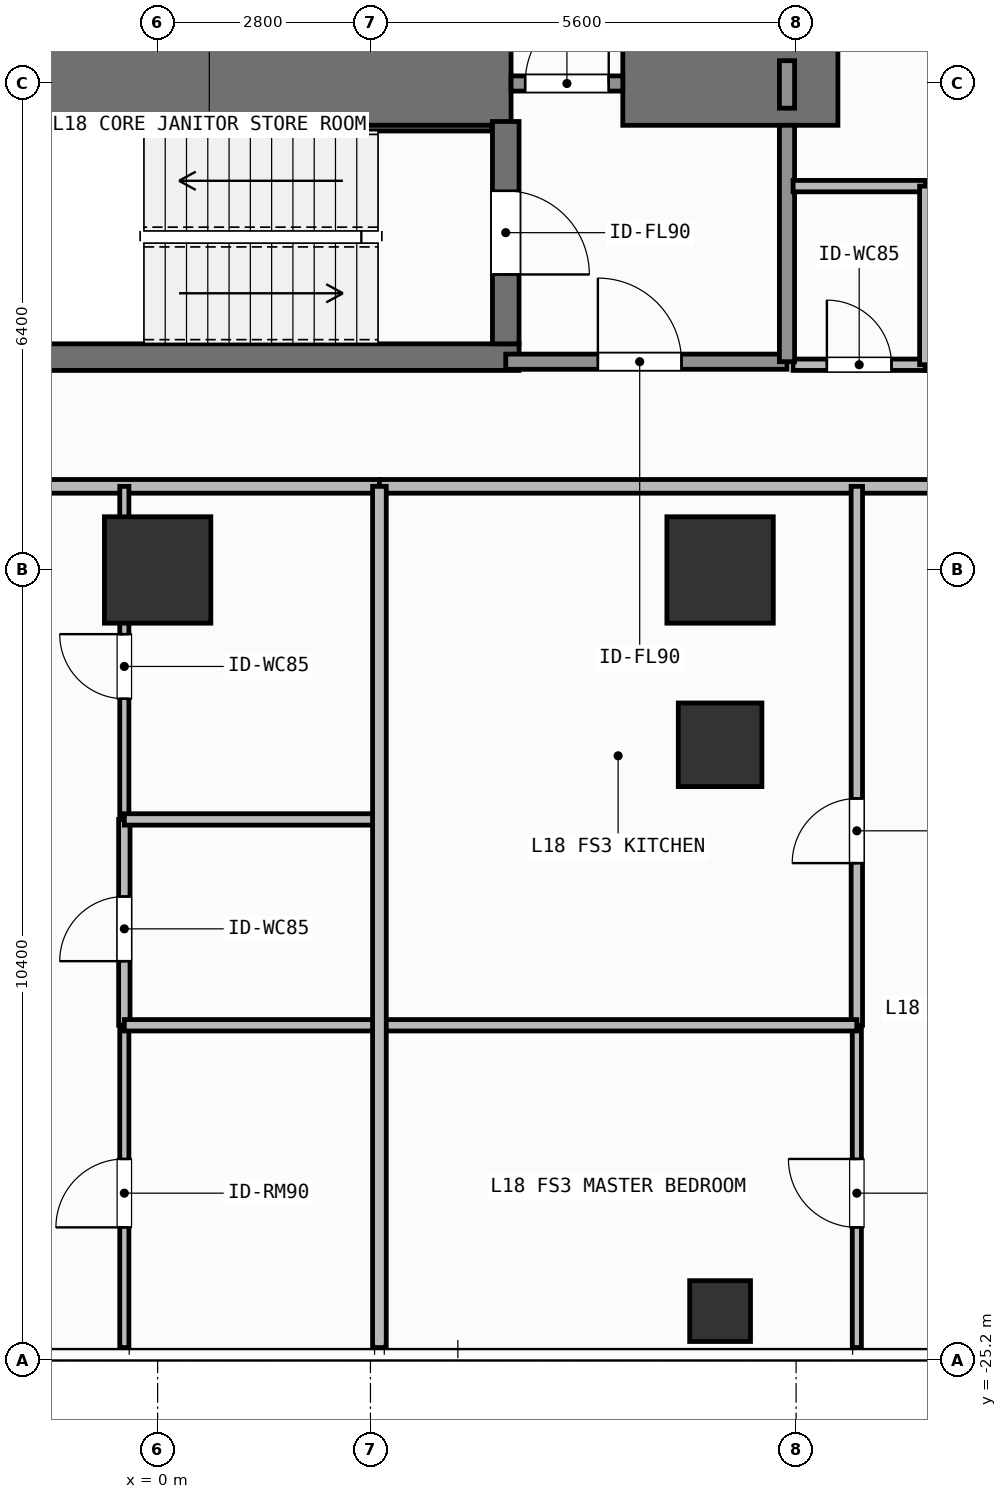
"""IFC4 building model, lengths in metres.
Left out: names, types, materials, properties, quantities, classifications, styles, units other than length and angle.
Written with IfcOpenShell. Run it as: python <this file> out.ifc"""

import sys

from ifc_helpers import new_model, si_unit, direction, frame, frame_2d, origin, origin_2d, place, context, subcontext, project, spatial, rectangle, hollow_rectangle, extrude, element, fill, save


model = new_model("IFC4")
c1 = context("Model", 3, precision=1e-05, world=origin(), true_north=direction((0.0, 1.0)))
c2 = subcontext(c1, "Body", "Model", "MODEL_VIEW")
j1 = project(units=[si_unit("LENGTHUNIT", "METRE"), si_unit("PLANEANGLEUNIT", "RADIAN")], contexts=[c1])
p1 = place(None, origin())
s1 = spatial("IfcSite", under=j1, at=p1, CompositionType="ELEMENT")
p2 = place(p1, origin())
s2 = spatial("IfcBuilding", under=s1, at=p2, CompositionType="ELEMENT")
p3 = place(p2, frame((0.0, 0.0, 69.6)))
s3 = spatial("IfcBuildingStorey", under=s2, at=p3, CompositionType="ELEMENT", Elevation=69.6)
p4 = place(p3, frame((-2.62, -8.4, 0.0), z_axis=(0.0, 0.0, 1.0), x_axis=(1.0, 0.0, 0.0)))
e1 = element("IfcWall", 1, at=p4, inside=s3, PredefinedType="SHEAR", context=c2, shape_type="SweptSolid", body=[
    extrude(rectangle(XDim=7.27, YDim=1.1, at=frame_2d((3.635, 0.0))), origin(), (0.0, 0.0, 1.0), 3.9),
])
p5 = place(p3, frame((6.12, -8.4, 0.0), z_axis=(0.0, 0.0, 1.0), x_axis=(1.0, 0.0, 0.0)))
e2 = element("IfcWall", 2, at=p5, inside=s3, PredefinedType="SHEAR", context=c2, shape_type="SweptSolid", body=[
    extrude(rectangle(XDim=2.83, YDim=1.1, at=frame_2d((1.415, 0.0))), origin(), (0.0, 0.0, 1.0), 3.9),
])
p6 = place(p3, frame((-2.555, -12.0, 0.0), z_axis=(0.0, 0.0, 1.0), x_axis=(1.0, 0.0, 0.0)))
e3 = element("IfcWall", 3, at=p6, inside=s3, PredefinedType="SHEAR", context=c2, shape_type="SweptSolid", body=[
    extrude(rectangle(XDim=7.31, YDim=0.35, at=frame_2d((3.655, 0.0))), origin(), (0.0, 0.0, 1.0), 3.9),
])
p7 = place(p3, frame((-2.2, -8.988, 0.0), z_axis=(0.0, 0.0, 1.0), x_axis=(1.0, 0.0, 0.0)))
e4 = element("IfcWall", 4, at=p7, inside=s3, PredefinedType="SHEAR", context=c2, shape_type="SweptSolid", body=[
    extrude(rectangle(XDim=6.6, YDim=0.075, at=frame_2d((3.3, 0.0))), origin(), (0.0, 0.0, 1.0), 3.9),
])
p8 = place(p3, frame((4.58, -8.9, 0.0), z_axis=(0.0, 0.0, 1.0), x_axis=(0.0, -1.0, 0.0)))
e5 = element("IfcWall", 5, at=p8, inside=s3, PredefinedType="SHEAR", context=c2, shape_type="SweptSolid", body=[
    extrude(rectangle(XDim=2.925, YDim=0.35, at=frame_2d((1.462, 0.0))), origin(), (0.0, 0.0, 1.0), 3.9),
])
p9 = place(p8, frame((0.913, 0.0, 0.0)))
e6 = element("IfcOpeningElement", 6, at=p9, cuts=e5, PredefinedType="OPENING", context=c2, shape_type="SweptSolid", body=[
    extrude(rectangle(XDim=1.1, YDim=2.15, at=frame_2d((0.55, 1.075))), frame((0.0, 0.185, 0.0), z_axis=(0.0, -1.0, 0.0), x_axis=(1.0, 0.0, 0.0)), (0.0, 0.0, 1.0), 0.37),
])
for number, where, z_axis, x_axis in (
    (7, (0.0, -14.8, 0.0), (0.0, 0.0, 1.0), (1.0, 0.0, 0.0)),
    (8, (7.4, -14.8, 0.0), (0.0, 0.0, 1.0), (1.0, 0.0, 0.0)),
):
    element("IfcColumn", number, at=place(p3, frame(where, z_axis=z_axis, x_axis=x_axis)), inside=s3, PredefinedType="COLUMN", context=c2, shape_type="SweptSolid", body=[
        extrude(rectangle(XDim=1.4, YDim=1.4, at=origin_2d()), origin(), (0.0, 0.0, 1.0), 3.9),
    ])
p10 = place(p3, frame((7.4, -17.1, 0.0), z_axis=(0.0, 0.0, 1.0), x_axis=(1.0, 0.0, 0.0)))
e9 = element("IfcColumn", 9, at=p10, inside=s3, PredefinedType="COLUMN", context=c2, shape_type="SweptSolid", body=[
    extrude(rectangle(XDim=1.1, YDim=1.1, at=origin_2d()), origin(), (0.0, 0.0, 1.0), 3.9),
])
p11 = place(p3, frame((7.4, -24.55, 0.0), z_axis=(0.0, 0.0, 1.0), x_axis=(1.0, 0.0, 0.0)))
e10 = element("IfcColumn", 10, at=p11, inside=s3, PredefinedType="COLUMN", context=c2, shape_type="SweptSolid", body=[
    extrude(hollow_rectangle(XDim=0.8, YDim=0.8, WallThickness=0.036, at=origin_2d()), origin(), (0.0, 0.0, 1.0), 3.9),
])
p12 = place(p3, frame((4.58, -12.06, 0.0), z_axis=(0.0, 0.0, 1.0), x_axis=(1.0, 0.0, 0.0)))
e11 = element("IfcWall", 11, at=p12, inside=s3, PredefinedType="SOLIDWALL", context=c2, shape_type="SweptSolid", body=[
    extrude(rectangle(XDim=3.7, YDim=0.2, at=frame_2d((1.85, 0.0))), origin(), (0.0, 0.0, 1.0), 3.68),
])
p13 = place(p12, frame((1.212, 0.0, 0.0)))
e12 = element("IfcOpeningElement", 12, at=p13, cuts=e11, PredefinedType="OPENING", context=c2, shape_type="SweptSolid", body=[
    extrude(rectangle(XDim=1.1, YDim=2.15, at=frame_2d((0.55, 1.075))), frame((0.0, 0.11, 0.0), z_axis=(0.0, -1.0, 0.0), x_axis=(1.0, 0.0, 0.0)), (0.0, 0.0, 1.0), 0.22),
])
p14 = place(p3, frame((4.65, -8.4, 0.0), z_axis=(0.0, 0.0, 1.0), x_axis=(1.0, 0.0, 0.0)))
e13 = element("IfcWall", 13, at=p14, inside=s3, PredefinedType="SOLIDWALL", context=c2, shape_type="SweptSolid", body=[
    extrude(rectangle(XDim=1.47, YDim=0.2, at=frame_2d((0.735, 0.0))), origin(), (0.0, 0.0, 1.0), 2.72),
])
p15 = place(p14, frame((0.185, 0.0, 0.0)))
e14 = element("IfcOpeningElement", 14, at=p15, cuts=e13, PredefinedType="OPENING", context=c2, shape_type="SweptSolid", body=[
    extrude(rectangle(XDim=1.1, YDim=2.15, at=frame_2d((0.55, 1.075))), frame((0.0, 0.11, 0.0), z_axis=(0.0, -1.0, 0.0), x_axis=(1.0, 0.0, 0.0)), (0.0, 0.0, 1.0), 0.22),
])
p16 = place(p3, frame((8.36, -12.1, 0.0), z_axis=(0.0, 0.0, 1.0), x_axis=(1.0, 0.0, 0.0)))
e15 = element("IfcWall", 15, at=p16, inside=s3, PredefinedType="PARTITIONING", context=c2, shape_type="SweptSolid", body=[
    extrude(rectangle(XDim=1.74, YDim=0.15, at=frame_2d((0.87, 0.0))), origin(), (0.0, 0.0, 1.0), 3.68),
])
p17 = place(p16, frame((0.445, 0.0, 0.0)))
e16 = element("IfcOpeningElement", 16, at=p17, cuts=e15, PredefinedType="OPENING", context=c2, shape_type="SweptSolid", body=[
    extrude(rectangle(XDim=0.85, YDim=2.1, at=frame_2d((0.425, 1.05))), frame((0.0, 0.085, 0.0), z_axis=(0.0, -1.0, 0.0), x_axis=(1.0, 0.0, 0.0)), (0.0, 0.0, 1.0), 0.17),
])
p18 = place(p3, frame((10.1, -12.1, 0.0), z_axis=(0.0, 0.0, 1.0), x_axis=(1.0, 0.0, 0.0)))
e17 = element("IfcWall", 17, at=p18, inside=s3, PredefinedType="PARTITIONING", context=c2, shape_type="SweptSolid", body=[
    extrude(rectangle(XDim=5.48, YDim=0.15, at=frame_2d((2.74, 0.0))), origin(), (0.0, 0.0, 1.0), 3.68),
])
p19 = place(p18, frame((2.29, 0.0, 0.0)))
e18 = element("IfcOpeningElement", 18, at=p19, cuts=e17, PredefinedType="OPENING", context=c2, shape_type="SweptSolid", body=[
    extrude(rectangle(XDim=0.9, YDim=2.1, at=frame_2d((0.45, 1.05))), frame((0.0, 0.085, 0.0), z_axis=(0.0, -1.0, 0.0), x_axis=(1.0, 0.0, 0.0)), (0.0, 0.0, 1.0), 0.17),
])
p20 = place(p3, frame((-7.061, -13.7, 0.0), z_axis=(0.0, 0.0, 1.0), x_axis=(1.0, 0.0, 0.0)))
e19 = element("IfcWall", 19, at=p20, inside=s3, PredefinedType="PARTITIONING", context=c2, shape_type="SweptSolid", body=[
    extrude(rectangle(XDim=9.979, YDim=0.18, at=frame_2d((4.99, 0.0))), origin(), (0.0, 0.0, 1.0), 3.68),
])
p21 = place(p20, frame((4.578, 0.0, 0.0)))
e20 = element("IfcOpeningElement", 20, at=p21, cuts=e19, PredefinedType="OPENING", context=c2, shape_type="SweptSolid", body=[
    extrude(rectangle(XDim=1.0, YDim=2.2, at=frame_2d((0.5, 1.1))), frame((0.0, 0.1, 0.0), z_axis=(0.0, -1.0, 0.0), x_axis=(1.0, 0.0, 0.0)), (0.0, 0.0, 1.0), 0.2),
])
p22 = place(p3, frame((-0.438, -20.79, 0.0), z_axis=(0.0, 0.0, 1.0), x_axis=(0.0, 1.0, 0.0)))
e21 = element("IfcWall", 21, at=p22, inside=s3, PredefinedType="PARTITIONING", context=c2, shape_type="SweptSolid", body=[
    extrude(rectangle(XDim=2.708, YDim=0.15, at=frame_2d((1.354, 0.0))), origin(), (0.0, 0.0, 1.0), 3.68),
])
p23 = place(p22, frame((0.844, 0.0, 0.0)))
e22 = element("IfcOpeningElement", 22, at=p23, cuts=e21, PredefinedType="OPENING", context=c2, shape_type="SweptSolid", body=[
    extrude(rectangle(XDim=0.85, YDim=2.1, at=frame_2d((0.425, 1.05))), frame((0.0, 0.085, 0.0), z_axis=(0.0, -1.0, 0.0), x_axis=(1.0, 0.0, 0.0)), (0.0, 0.0, 1.0), 0.17),
])
p24 = place(p3, frame((-0.438, -18.082, 0.0), z_axis=(0.0, 0.0, 1.0), x_axis=(0.0, 1.0, 0.0)))
e23 = element("IfcWall", 23, at=p24, inside=s3, PredefinedType="PARTITIONING", context=c2, shape_type="SweptSolid", body=[
    extrude(rectangle(XDim=4.382, YDim=0.12, at=frame_2d((2.191, 0.0))), origin(), (0.0, 0.0, 1.0), 3.68),
])
p25 = place(p24, frame((1.588, 0.0, 0.0)))
e24 = element("IfcOpeningElement", 24, at=p25, cuts=e23, PredefinedType="OPENING", context=c2, shape_type="SweptSolid", body=[
    extrude(rectangle(XDim=0.85, YDim=2.1, at=frame_2d((0.425, 1.05))), frame((0.0, 0.07, 0.0), z_axis=(0.0, -1.0, 0.0), x_axis=(1.0, 0.0, 0.0)), (0.0, 0.0, 1.0), 0.14),
])
p26 = place(p3, frame((-0.438, -25.03, 0.0), z_axis=(0.0, 0.0, 1.0), x_axis=(0.0, 1.0, 0.0)))
e25 = element("IfcWall", 25, at=p26, inside=s3, PredefinedType="PARTITIONING", context=c2, shape_type="SweptSolid", body=[
    extrude(rectangle(XDim=4.24, YDim=0.12, at=frame_2d((2.12, 0.0))), origin(), (0.0, 0.0, 1.0), 3.68),
])
p27 = place(p26, frame((1.581, 0.0, 0.0)))
e26 = element("IfcOpeningElement", 26, at=p27, cuts=e25, PredefinedType="OPENING", context=c2, shape_type="SweptSolid", body=[
    extrude(rectangle(XDim=0.9, YDim=2.1, at=frame_2d((0.45, 1.05))), frame((0.0, 0.07, 0.0), z_axis=(0.0, -1.0, 0.0), x_axis=(1.0, 0.0, 0.0)), (0.0, 0.0, 1.0), 0.14),
])
p28 = place(p3, frame((2.918, -13.7, 0.0), z_axis=(0.0, 0.0, 1.0), x_axis=(1.0, 0.0, 0.0)))
e27 = element("IfcWall", 27, at=p28, inside=s3, PredefinedType="PARTITIONING", context=c2, shape_type="SweptSolid", body=[
    extrude(rectangle(XDim=15.702, YDim=0.18, at=frame_2d((7.851, 0.0))), origin(), (0.0, 0.0, 1.0), 3.68),
])
p29 = place(p28, frame((7.531, 0.0, 0.0)))
e28 = element("IfcOpeningElement", 28, at=p29, cuts=e27, PredefinedType="OPENING", context=c2, shape_type="SweptSolid", body=[
    extrude(rectangle(XDim=1.0, YDim=2.2, at=frame_2d((0.5, 1.1))), frame((0.0, 0.1, 0.0), z_axis=(0.0, -1.0, 0.0), x_axis=(1.0, 0.0, 0.0)), (0.0, 0.0, 1.0), 0.2),
])
p30 = place(p3, frame((9.199, -20.79, 0.0), z_axis=(0.0, 0.0, 1.0), x_axis=(0.0, 1.0, 0.0)))
e29 = element("IfcWall", 29, at=p30, inside=s3, PredefinedType="PARTITIONING", context=c2, shape_type="SweptSolid", body=[
    extrude(rectangle(XDim=7.09, YDim=0.15, at=frame_2d((3.545, 0.0))), origin(), (0.0, 0.0, 1.0), 3.68),
])
p31 = place(p30, frame((2.133, 0.0, 0.0)))
e30 = element("IfcOpeningElement", 30, at=p31, cuts=e29, PredefinedType="OPENING", context=c2, shape_type="SweptSolid", body=[
    extrude(rectangle(XDim=0.85, YDim=2.1, at=frame_2d((0.425, 1.05))), frame((0.0, 0.085, 0.0), z_axis=(0.0, -1.0, 0.0), x_axis=(1.0, 0.0, 0.0)), (0.0, 0.0, 1.0), 0.17),
])
p32 = place(p3, frame((9.199, -25.03, 0.0), z_axis=(0.0, 0.0, 1.0), x_axis=(0.0, 1.0, 0.0)))
e31 = element("IfcWall", 31, at=p32, inside=s3, PredefinedType="PARTITIONING", context=c2, shape_type="SweptSolid", body=[
    extrude(rectangle(XDim=4.24, YDim=0.12, at=frame_2d((2.12, 0.0))), origin(), (0.0, 0.0, 1.0), 3.68),
])
p33 = place(p32, frame((1.581, 0.0, 0.0)))
e32 = element("IfcOpeningElement", 32, at=p33, cuts=e31, PredefinedType="OPENING", context=c2, shape_type="SweptSolid", body=[
    extrude(rectangle(XDim=0.9, YDim=2.1, at=frame_2d((0.45, 1.05))), frame((0.0, 0.07, 0.0), z_axis=(0.0, -1.0, 0.0), x_axis=(1.0, 0.0, 0.0)), (0.0, 0.0, 1.0), 0.14),
])
p34 = place(p3, frame((8.28, -12.06, 0.0), z_axis=(0.0, 0.0, 1.0), x_axis=(0.0, 1.0, 0.0)))
e33 = element("IfcWall", 33, at=p34, inside=s3, PredefinedType="SOLIDWALL", context=c2, shape_type="SweptSolid", body=[
    extrude(rectangle(XDim=3.11, YDim=0.2, at=frame_2d((1.555, 0.0))), origin(), (0.0, 0.0, 1.0), 3.68),
])
p35 = place(p3, frame((8.28, -8.725, 0.0), z_axis=(0.0, 0.0, 1.0), x_axis=(0.0, 1.0, 0.0)))
e34 = element("IfcWall", 34, at=p35, inside=s3, PredefinedType="SOLIDWALL", context=c2, shape_type="SweptSolid", body=[
    extrude(rectangle(XDim=0.625, YDim=0.2, at=frame_2d((0.312, 0.0))), origin(), (0.0, 0.0, 1.0), 3.68),
])
p36 = place(p3, frame((8.36, -9.75, 0.0), z_axis=(0.0, 0.0, 1.0), x_axis=(1.0, 0.0, 0.0)))
e35 = element("IfcWall", 35, at=p36, inside=s3, PredefinedType="PARTITIONING", context=c2, shape_type="SweptSolid", body=[
    extrude(rectangle(XDim=1.74, YDim=0.15, at=frame_2d((0.87, 0.0))), origin(), (0.0, 0.0, 1.0), 3.68),
])
p37 = place(p3, frame((10.1, -12.1, 0.0), z_axis=(0.0, 0.0, 1.0), x_axis=(0.0, 1.0, 0.0)))
e36 = element("IfcWall", 36, at=p37, inside=s3, PredefinedType="PARTITIONING", context=c2, shape_type="SweptSolid", body=[
    extrude(rectangle(XDim=2.35, YDim=0.15, at=frame_2d((1.175, 0.0))), origin(), (0.0, 0.0, 1.0), 3.68),
])
for number, where, z_axis, x_axis in (
    (37, (-0.438, -18.082, 0.0), (0.0, 0.0, 1.0), (1.0, 0.0, 0.0)),
    (38, (-0.438, -20.79, 0.0), (0.0, 0.0, 1.0), (1.0, 0.0, 0.0)),
):
    element("IfcWall", number, at=place(p3, frame(where, z_axis=z_axis, x_axis=x_axis)), inside=s3, PredefinedType="PARTITIONING", context=c2, shape_type="SweptSolid", body=[
        extrude(rectangle(XDim=3.356, YDim=0.15, at=frame_2d((1.678, 0.0))), origin(), (0.0, 0.0, 1.0), 3.68),
    ])
p38 = place(p3, frame((2.918, -20.79, 0.0), z_axis=(0.0, 0.0, 1.0), x_axis=(1.0, 0.0, 0.0)))
e39 = element("IfcWall", 39, at=p38, inside=s3, PredefinedType="PARTITIONING", context=c2, shape_type="SweptSolid", body=[
    extrude(rectangle(XDim=6.281, YDim=0.15, at=frame_2d((3.141, 0.0))), origin(), (0.0, 0.0, 1.0), 3.68),
])
p39 = place(p3, frame((2.918, -25.03, 0.0), z_axis=(0.0, 0.0, 1.0), x_axis=(0.0, 1.0, 0.0)))
e40 = element("IfcWall", 40, at=p39, inside=s3, PredefinedType="PARTITIONING", context=c2, shape_type="SweptSolid", body=[
    extrude(rectangle(XDim=11.33, YDim=0.18, at=frame_2d((5.665, 0.0))), origin(), (0.0, 0.0, 1.0), 3.68),
])
p40 = place(p9, origin())
e41 = element("IfcDoor", 41, at=p40, inside=s3, OperationType="SINGLE_SWING_RIGHT", PredefinedType="DOOR", context=c2, shape_type="SweptSolid", body=[
    extrude(rectangle(XDim=1.1, YDim=2.15, at=frame_2d((0.55, 1.075))), frame((0.0, 0.025, 0.0), z_axis=(0.0, -1.0, 0.0), x_axis=(1.0, 0.0, 0.0)), (0.0, 0.0, 1.0), 0.05),
])
fill(e6, e41)
p41 = place(p13, origin())
e42 = element("IfcDoor", 42, at=p41, inside=s3, OperationType="SINGLE_SWING_LEFT", PredefinedType="DOOR", context=c2, shape_type="SweptSolid", body=[
    extrude(rectangle(XDim=1.1, YDim=2.15, at=frame_2d((0.55, 1.075))), frame((0.0, 0.025, 0.0), z_axis=(0.0, -1.0, 0.0), x_axis=(1.0, 0.0, 0.0)), (0.0, 0.0, 1.0), 0.05),
])
fill(e12, e42)
p42 = place(p15, origin())
e43 = element("IfcDoor", 43, at=p42, inside=s3, OperationType="SINGLE_SWING_RIGHT", PredefinedType="DOOR", context=c2, shape_type="SweptSolid", body=[
    extrude(rectangle(XDim=1.1, YDim=2.15, at=frame_2d((0.55, 1.075))), frame((0.0, 0.025, 0.0), z_axis=(0.0, -1.0, 0.0), x_axis=(1.0, 0.0, 0.0)), (0.0, 0.0, 1.0), 0.05),
])
fill(e14, e43)
p43 = place(p17, origin())
e44 = element("IfcDoor", 44, at=p43, inside=s3, OperationType="SINGLE_SWING_LEFT", PredefinedType="DOOR", context=c2, shape_type="SweptSolid", body=[
    extrude(rectangle(XDim=0.85, YDim=2.1, at=frame_2d((0.425, 1.05))), frame((0.0, 0.025, 0.0), z_axis=(0.0, -1.0, 0.0), x_axis=(1.0, 0.0, 0.0)), (0.0, 0.0, 1.0), 0.05),
])
fill(e16, e44)
p44 = place(p23, origin())
e45 = element("IfcDoor", 45, at=p44, inside=s3, OperationType="SINGLE_SWING_LEFT", PredefinedType="DOOR", context=c2, shape_type="SweptSolid", body=[
    extrude(rectangle(XDim=0.85, YDim=2.1, at=frame_2d((0.425, 1.05))), frame((0.0, 0.025, 0.0), z_axis=(0.0, -1.0, 0.0), x_axis=(1.0, 0.0, 0.0)), (0.0, 0.0, 1.0), 0.05),
])
fill(e22, e45)
p45 = place(p25, origin())
e46 = element("IfcDoor", 46, at=p45, inside=s3, OperationType="SINGLE_SWING_RIGHT", PredefinedType="DOOR", context=c2, shape_type="SweptSolid", body=[
    extrude(rectangle(XDim=0.85, YDim=2.1, at=frame_2d((0.425, 1.05))), frame((0.0, 0.025, 0.0), z_axis=(0.0, -1.0, 0.0), x_axis=(1.0, 0.0, 0.0)), (0.0, 0.0, 1.0), 0.05),
])
fill(e24, e46)
p46 = place(p27, origin())
e47 = element("IfcDoor", 47, at=p46, inside=s3, OperationType="SINGLE_SWING_LEFT", PredefinedType="DOOR", context=c2, shape_type="SweptSolid", body=[
    extrude(rectangle(XDim=0.9, YDim=2.1, at=frame_2d((0.45, 1.05))), frame((0.0, 0.025, 0.0), z_axis=(0.0, -1.0, 0.0), x_axis=(1.0, 0.0, 0.0)), (0.0, 0.0, 1.0), 0.05),
])
fill(e26, e47)
p47 = place(p31, origin())
e48 = element("IfcDoor", 48, at=p47, inside=s3, OperationType="SINGLE_SWING_LEFT", PredefinedType="DOOR", context=c2, shape_type="SweptSolid", body=[
    extrude(rectangle(XDim=0.85, YDim=2.1, at=frame_2d((0.425, 1.05))), frame((0.0, 0.025, 0.0), z_axis=(0.0, -1.0, 0.0), x_axis=(1.0, 0.0, 0.0)), (0.0, 0.0, 1.0), 0.05),
])
fill(e30, e48)
p48 = place(p33, origin())
e49 = element("IfcDoor", 49, at=p48, inside=s3, OperationType="SINGLE_SWING_RIGHT", PredefinedType="DOOR", context=c2, shape_type="SweptSolid", body=[
    extrude(rectangle(XDim=0.9, YDim=2.1, at=frame_2d((0.45, 1.05))), frame((0.0, 0.025, 0.0), z_axis=(0.0, -1.0, 0.0), x_axis=(1.0, 0.0, 0.0)), (0.0, 0.0, 1.0), 0.05),
])
fill(e32, e49)
save(model, sys.argv[1])
